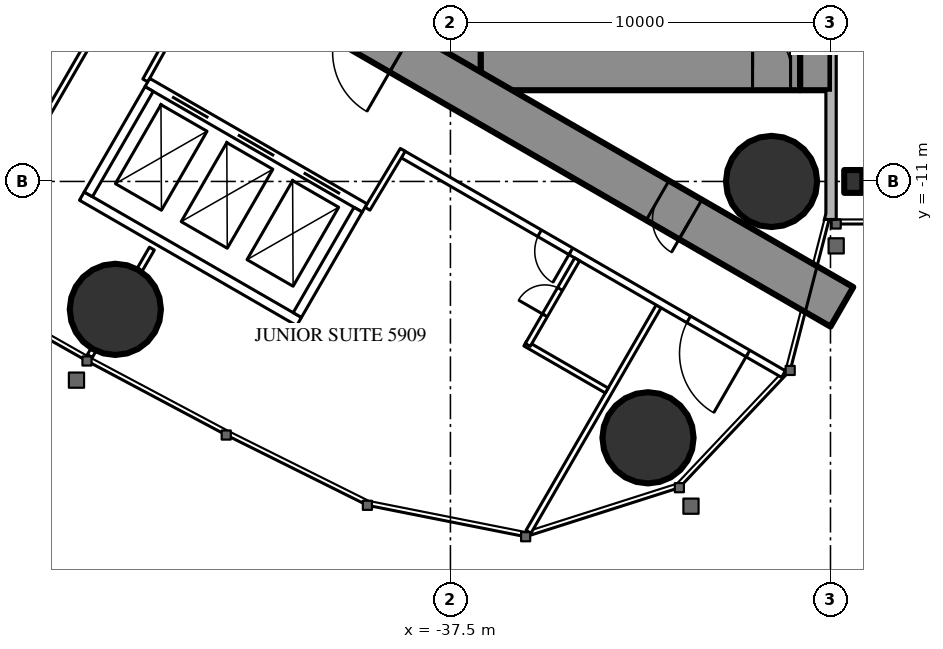
"""IFC4 building model, lengths in metres.
Left out: names, types, materials, properties, quantities, classifications, styles, units other than length and angle.
Written with IfcOpenShell. Run it as: python <this file> out.ifc"""

import sys

from ifc_helpers import new_model, si_unit, direction, frame, frame_2d, origin, origin_2d, place, context, subcontext, project, spatial, rectangle, circle, i_section, extrude, element, fill, save


model = new_model("IFC4")
c1 = context("Model", 3, precision=1e-05, world=origin(), true_north=direction((0.0, 1.0)))
c2 = subcontext(c1, "Body", "Model", "MODEL_VIEW")
j1 = project(units=[si_unit("LENGTHUNIT", "METRE"), si_unit("PLANEANGLEUNIT", "RADIAN")], contexts=[c1])
p1 = place(None, origin())
s1 = spatial("IfcSite", under=j1, at=p1, CompositionType="ELEMENT")
p2 = place(p1, origin())
s2 = spatial("IfcBuilding", under=s1, at=p2, CompositionType="ELEMENT")
p3 = place(p2, frame((0.0, 0.0, 222.5)))
s3 = spatial("IfcBuildingStorey", under=s2, at=p3, CompositionType="ELEMENT", Elevation=222.5)
for number, where, z_axis, x_axis in (
    (1, (-32.301, -17.745, 0.0), (0.0, 0.0, 1.0), (1.0, 0.0, 0.0)),
    (2, (-29.05, -11.0, 0.0), (0.0, 0.0, 1.0), (1.0, 0.0, 0.0)),
    (3, (-46.317, -14.365, 0.0), (0.0, 0.0, 1.0), (1.0, 0.0, 0.0)),
):
    element("IfcColumn", number, at=place(p3, frame(where, z_axis=z_axis, x_axis=x_axis)), inside=s3, PredefinedType="COLUMN", context=c2, shape_type="SweptSolid", body=[
        extrude(circle(Radius=1.2, at=origin_2d()), origin(), (0.0, 0.0, 1.0), 3.6),
    ])
p4 = place(p3, frame((-27.9, 8.6, 0.0), z_axis=(0.0, 0.0, 1.0), x_axis=(0.0, -1.0, 0.0)))
e4 = element("IfcWall", 4, at=p4, inside=s3, PredefinedType="SHEAR", context=c2, shape_type="SweptSolid", body=[
    extrude(rectangle(XDim=17.2, YDim=0.8, at=frame_2d((8.6, 0.0))), origin(), (0.0, 0.0, 1.0), 3.6),
])
p5 = place(p4, frame((6.95, 0.0, 0.0)))
e5 = element("IfcOpeningElement", 5, at=p5, cuts=e4, PredefinedType="OPENING", context=c2, shape_type="SweptSolid", body=[
    extrude(rectangle(XDim=0.9, YDim=2.2, at=frame_2d((0.45, 1.1))), frame((0.0, 0.41, 0.0), z_axis=(0.0, -1.0, 0.0), x_axis=(1.0, 0.0, 0.0)), (0.0, 0.0, 1.0), 0.82),
])
p6 = place(p3, frame((-37.3, 8.6, 0.0), z_axis=(0.0, 0.0, 1.0), x_axis=(0.0, -1.0, 0.0)))
e6 = element("IfcWall", 6, at=p6, inside=s3, PredefinedType="SHEAR", context=c2, shape_type="SweptSolid", body=[
    extrude(rectangle(XDim=17.2, YDim=1.2, at=frame_2d((8.6, 0.0))), origin(), (0.0, 0.0, 1.0), 3.6),
])
p7 = place(p6, frame((7.7, 0.0, 0.0)))
e7 = element("IfcOpeningElement", 7, at=p7, cuts=e6, PredefinedType="OPENING", context=c2, shape_type="SweptSolid", body=[
    extrude(rectangle(XDim=1.8, YDim=2.2, at=frame_2d((0.9, 1.1))), frame((0.0, 0.61, 0.0), z_axis=(0.0, -1.0, 0.0), x_axis=(1.0, 0.0, 0.0)), (0.0, 0.0, 1.0), 1.22),
])
p8 = place(p3, frame((-28.3, -8.0, 0.0), z_axis=(0.0, 0.0, 1.0), x_axis=(-1.0, 0.0, 0.0)))
e8 = element("IfcWall", 8, at=p8, inside=s3, PredefinedType="SHEAR", context=c2, shape_type="SweptSolid", body=[
    extrude(rectangle(XDim=8.4, YDim=1.2, at=frame_2d((4.2, 0.0))), origin(), (0.0, 0.0, 1.0), 3.6),
])
p9 = place(p8, frame((0.25, 0.0, 0.0)))
e9 = element("IfcOpeningElement", 9, at=p9, cuts=e8, PredefinedType="OPENING", context=c2, shape_type="SweptSolid", body=[
    extrude(rectangle(XDim=1.0, YDim=2.2, at=frame_2d((0.5, 1.1))), frame((0.0, 0.61, 0.0), z_axis=(0.0, -1.0, 0.0), x_axis=(1.0, 0.0, 0.0)), (0.0, 0.0, 1.0), 1.22),
])
p10 = place(p3, frame((-27.2, -14.3, 0.0), z_axis=(0.0, 0.0, 1.0), x_axis=(-0.866024021859, 0.500002393557, 0.0)))
e10 = element("IfcWall", 10, at=p10, inside=s3, PredefinedType="SHEAR", context=c2, shape_type="SweptSolid", body=[
    extrude(rectangle(XDim=27.907, YDim=1.2, at=frame_2d((13.954, 0.0))), origin(), (0.0, 0.0, 1.0), 3.6),
])
p11 = place(p10, frame((4.6, 0.0, 0.0)))
e11 = element("IfcOpeningElement", 11, at=p11, cuts=e10, PredefinedType="OPENING", context=c2, shape_type="SweptSolid", body=[
    extrude(rectangle(XDim=1.0, YDim=2.2, at=frame_2d((0.5, 1.1))), frame((0.0, 0.61, 0.0), z_axis=(0.0, -1.0, 0.0), x_axis=(1.0, 0.0, 0.0)), (0.0, 0.0, 1.0), 1.22),
])
p12 = place(p10, frame((13.395, 0.0, 0.0)))
e12 = element("IfcOpeningElement", 12, at=p12, cuts=e10, PredefinedType="OPENING", context=c2, shape_type="SweptSolid", body=[
    extrude(rectangle(XDim=1.8, YDim=2.2, at=frame_2d((0.9, 1.1))), frame((0.0, 0.61, 0.0), z_axis=(0.0, -1.0, 0.0), x_axis=(1.0, 0.0, 0.0)), (0.0, 0.0, 1.0), 1.22),
])
p13 = place(p3, frame((-26.9, -11.0, 0.0), z_axis=(0.0, 0.0, 1.0), x_axis=(1.0, 0.0, 0.0)))
e13 = element("IfcColumn", 13, at=p13, inside=s3, PredefinedType="COLUMN", context=c2, shape_type="SweptSolid", body=[
    extrude(i_section(OverallWidth=0.476, OverallDepth=0.6, WebThickness=0.1, FlangeThickness=0.14, FilletRadius=0.02, at=origin_2d()), origin(), (0.0, 0.0, 1.0), 3.6),
])
p14 = place(p3, frame((-32.022, -14.287, 0.0), z_axis=(0.0, 0.0, 1.0), x_axis=(-0.50000019414, -0.866025291697, 0.0)))
e14 = element("IfcWall", 14, at=p14, inside=s3, PredefinedType="PARTITIONING", context=c2, shape_type="SweptSolid", body=[
    extrude(rectangle(XDim=6.848, YDim=0.15, at=frame_2d((3.424, 0.0))), origin(), (0.0, 0.0, 1.0), 3.35),
])
p15 = place(p3, frame((-46.898, -15.439, 0.0), z_axis=(0.0, 0.0, 1.0), x_axis=(-0.500232303069, -0.865891241997, 0.0)))
e15 = element("IfcWall", 15, at=p15, inside=s3, PredefinedType="PARTITIONING", context=c2, shape_type="SweptSolid", body=[
    extrude(rectangle(XDim=0.18, YDim=0.15, at=frame_2d((0.09, 0.0))), origin(), (0.0, 0.0, 1.0), 2.45),
])
p16 = place(p3, frame((-46.274, -6.059, 0.0), z_axis=(0.0, 0.0, 1.0), x_axis=(-0.500020471368, -0.866013584312, 0.0)))
e16 = element("IfcWall", 16, at=p16, inside=s3, PredefinedType="PARTITIONING", context=c2, shape_type="SweptSolid", body=[
    extrude(rectangle(XDim=6.028, YDim=0.15, at=frame_2d((3.014, 0.0))), origin(), (0.0, 0.0, 1.0), 2.45),
])
p17 = place(p3, frame((-45.356, -12.767, 0.0), z_axis=(0.0, 0.0, 1.0), x_axis=(-0.499886366516, -0.866091000168, 0.0)))
e17 = element("IfcWall", 17, at=p17, inside=s3, PredefinedType="PARTITIONING", context=c2, shape_type="SweptSolid", body=[
    extrude(rectangle(XDim=0.645, YDim=0.15, at=frame_2d((0.322, 0.0))), origin(), (0.0, 0.0, 1.0), 3.35),
])
p18 = place(p3, frame((-28.737, -16.068, 0.0), z_axis=(0.0, 0.0, 1.0), x_axis=(-0.866029399323, 0.49999307946, 0.0)))
e18 = element("IfcWall", 18, at=p18, inside=s3, PredefinedType="PARTITIONING", context=c2, shape_type="SweptSolid", body=[
    extrude(rectangle(XDim=11.61, YDim=0.2, at=frame_2d((5.805, 0.0))), origin(), (0.0, 0.0, 1.0), 3.35),
])
p19 = place(p18, frame((1.08, 0.0, 0.0)))
e19 = element("IfcOpeningElement", 19, at=p19, cuts=e18, PredefinedType="OPENING", context=c2, shape_type="SweptSolid", body=[
    extrude(rectangle(XDim=1.8, YDim=2.03, at=frame_2d((0.9, 1.015))), frame((0.0, 0.11, 0.0), z_axis=(0.0, -1.0, 0.0), x_axis=(1.0, 0.0, 0.0)), (0.0, 0.0, 1.0), 0.22),
])
p20 = place(p18, frame((6.46, 0.0, 0.0)))
e20 = element("IfcOpeningElement", 20, at=p20, cuts=e18, PredefinedType="OPENING", context=c2, shape_type="SweptSolid", body=[
    extrude(rectangle(XDim=0.95, YDim=2.2, at=frame_2d((0.475, 1.1))), frame((0.0, 0.11, 0.0), z_axis=(0.0, -1.0, 0.0), x_axis=(1.0, 0.0, 0.0)), (0.0, 0.0, 1.0), 0.22),
])
for number, where, z_axis, x_axis in (
    (21, (-39.683, -11.718, 0.0), (0.0, 0.0, 1.0), (0.514, 0.858, 0.0)),
    (22, (-44.652, -6.764, 0.0), (0.0, 0.0, 1.0), (-0.485, -0.874, 0.0)),
):
    element("IfcWall", number, at=place(p3, frame(where, z_axis=z_axis, x_axis=x_axis)), inside=s3, PredefinedType="PARTITIONING", context=c2, shape_type="SweptSolid", body=[
        extrude(rectangle(XDim=1.805, YDim=0.15, at=frame_2d((0.903, 0.0))), origin(), (0.0, 0.0, 1.0), 3.35),
    ])
p21 = place(p3, frame((-33.387, -16.502, 0.0), z_axis=(0.0, 0.0, 1.0), x_axis=(-0.866006523861, 0.500032699561, 0.0)))
e23 = element("IfcWall", 23, at=p21, inside=s3, PredefinedType="PARTITIONING", context=c2, shape_type="SweptSolid", body=[
    extrude(rectangle(XDim=2.475, YDim=0.15, at=frame_2d((1.237, 0.0))), origin(), (0.0, 0.0, 1.0), 3.35),
])
p22 = place(p3, frame((-34.165, -13.05, 0.0), z_axis=(0.0, 0.0, 1.0), x_axis=(-0.500047596559, -0.865997922154, 0.0)))
e24 = element("IfcWall", 24, at=p22, inside=s3, PredefinedType="PARTITIONING", context=c2, shape_type="SweptSolid", body=[
    extrude(rectangle(XDim=2.6, YDim=0.15, at=frame_2d((1.3, 0.0))), origin(), (0.0, 0.0, 1.0), 3.35),
])
p23 = place(p22, frame((0.9, 0.0, 0.0)))
e25 = element("IfcOpeningElement", 25, at=p23, cuts=e24, PredefinedType="OPENING", context=c2, shape_type="SweptSolid", body=[
    extrude(rectangle(XDim=0.8, YDim=2.2, at=frame_2d((0.4, 1.1))), frame((0.0, 0.085, 0.0), z_axis=(0.0, -1.0, 0.0), x_axis=(1.0, 0.0, 0.0)), (0.0, 0.0, 1.0), 0.17),
])
p24 = place(p3, frame((-39.758, -11.697, 0.0), z_axis=(0.0, 0.0, 1.0), x_axis=(-0.866024194504, 0.500002094529, 0.0)))
e26 = element("IfcWall", 26, at=p24, inside=s3, PredefinedType="PARTITIONING", context=c2, shape_type="SweptSolid", body=[
    extrude(rectangle(XDim=6.6, YDim=0.25, at=frame_2d((3.3, 0.0))), origin(), (0.0, 0.0, 1.0), 3.35),
])
p25 = place(p24, frame((0.75, 0.0, 0.0)))
e27 = element("IfcOpeningElement", 27, at=p25, cuts=e26, PredefinedType="OPENING", context=c2, shape_type="SweptSolid", body=[
    extrude(rectangle(XDim=1.1, YDim=2.2, at=frame_2d((0.55, 1.1))), frame((0.0, 0.135, 0.0), z_axis=(0.0, -1.0, 0.0), x_axis=(1.0, 0.0, 0.0)), (0.0, 0.0, 1.0), 0.27),
])
p26 = place(p24, frame((2.75, 0.0, 0.0)))
e28 = element("IfcOpeningElement", 28, at=p26, cuts=e26, PredefinedType="OPENING", context=c2, shape_type="SweptSolid", body=[
    extrude(rectangle(XDim=1.1, YDim=2.2, at=frame_2d((0.55, 1.1))), frame((0.0, 0.135, 0.0), z_axis=(0.0, -1.0, 0.0), x_axis=(1.0, 0.0, 0.0)), (0.0, 0.0, 1.0), 0.27),
])
p27 = place(p24, frame((4.75, 0.0, 0.0)))
e29 = element("IfcOpeningElement", 29, at=p27, cuts=e26, PredefinedType="OPENING", context=c2, shape_type="SweptSolid", body=[
    extrude(rectangle(XDim=1.1, YDim=2.2, at=frame_2d((0.55, 1.1))), frame((0.0, 0.135, 0.0), z_axis=(0.0, -1.0, 0.0), x_axis=(1.0, 0.0, 0.0)), (0.0, 0.0, 1.0), 0.27),
])
p28 = place(p3, frame((-41.482, -14.686, 0.0), z_axis=(0.0, 0.0, 1.0), x_axis=(-0.86603344179, 0.499986077507, 0.0)))
e30 = element("IfcWall", 30, at=p28, inside=s3, PredefinedType="PARTITIONING", context=c2, shape_type="SweptSolid", body=[
    extrude(rectangle(XDim=6.6, YDim=0.25, at=frame_2d((3.3, 0.0))), origin(), (0.0, 0.0, 1.0), 3.35),
])
for number, where, z_axis, x_axis in (
    (31, (-39.928, -11.743, 0.0), (0.0, 0.0, 1.0), (-0.5, -0.866, 0.0)),
    (32, (-45.428, -8.568, 0.0), (0.0, 0.0, 1.0), (-0.5, -0.866, 0.0)),
):
    element("IfcWall", number, at=place(p3, frame(where, z_axis=z_axis, x_axis=x_axis)), inside=s3, PredefinedType="PARTITIONING", context=c2, shape_type="SweptSolid", body=[
        extrude(rectangle(XDim=3.201, YDim=0.25, at=frame_2d((1.6, 0.0))), origin(), (0.0, 0.0, 1.0), 3.35),
    ])
p29 = place(p19, origin())
e33 = element("IfcDoor", 33, at=p29, inside=s3, OperationType="DOUBLE_DOOR_SINGLE_SWING", PredefinedType="DOOR", context=c2, shape_type="SweptSolid", body=[
    extrude(rectangle(XDim=1.8, YDim=2.03, at=frame_2d((0.9, 1.015))), frame((0.0, 0.025, 0.0), z_axis=(0.0, -1.0, 0.0), x_axis=(1.0, 0.0, 0.0)), (0.0, 0.0, 1.0), 0.05),
])
fill(e19, e33)
p30 = place(p23, origin())
e34 = element("IfcDoor", 34, at=p30, inside=s3, OperationType="SINGLE_SWING_RIGHT", PredefinedType="DOOR", context=c2, shape_type="SweptSolid", body=[
    extrude(rectangle(XDim=0.8, YDim=2.2, at=frame_2d((0.4, 1.1))), frame((0.0, 0.025, 0.0), z_axis=(0.0, -1.0, 0.0), x_axis=(1.0, 0.0, 0.0)), (0.0, 0.0, 1.0), 0.05),
])
fill(e25, e34)
p31 = place(p20, origin())
e35 = element("IfcDoor", 35, at=p31, inside=s3, OperationType="SINGLE_SWING_LEFT", PredefinedType="DOOR", context=c2, shape_type="SweptSolid", body=[
    extrude(rectangle(XDim=0.95, YDim=2.2, at=frame_2d((0.475, 1.1))), frame((0.0, 0.025, 0.0), z_axis=(0.0, -1.0, 0.0), x_axis=(1.0, 0.0, 0.0)), (0.0, 0.0, 1.0), 0.05),
])
fill(e20, e35)
p32 = place(p11, origin())
e36 = element("IfcDoor", 36, at=p32, inside=s3, OperationType="SINGLE_SWING_LEFT", PredefinedType="DOOR", context=c2, shape_type="SweptSolid", body=[
    extrude(rectangle(XDim=1.0, YDim=2.2, at=frame_2d((0.5, 1.1))), frame((0.0, 0.025, 0.0), z_axis=(0.0, -1.0, 0.0), x_axis=(1.0, 0.0, 0.0)), (0.0, 0.0, 1.0), 0.05),
])
fill(e11, e36)
p33 = place(p12, origin())
e37 = element("IfcDoor", 37, at=p33, inside=s3, OperationType="DOUBLE_DOOR_SINGLE_SWING", PredefinedType="DOOR", context=c2, shape_type="SweptSolid", body=[
    extrude(rectangle(XDim=1.8, YDim=2.2, at=frame_2d((0.9, 1.1))), frame((0.0, 0.025, 0.0), z_axis=(0.0, -1.0, 0.0), x_axis=(1.0, 0.0, 0.0)), (0.0, 0.0, 1.0), 0.05),
])
fill(e12, e37)
p34 = place(p9, origin())
e38 = element("IfcDoor", 38, at=p34, inside=s3, OperationType="SINGLE_SWING_RIGHT", PredefinedType="DOOR", context=c2, shape_type="SweptSolid", body=[
    extrude(rectangle(XDim=1.0, YDim=2.2, at=frame_2d((0.5, 1.1))), frame((0.0, 0.025, 0.0), z_axis=(0.0, -1.0, 0.0), x_axis=(1.0, 0.0, 0.0)), (0.0, 0.0, 1.0), 0.05),
])
fill(e9, e38)
p35 = place(p25, origin())
e39 = element("IfcDoor", 39, at=p35, inside=s3, OperationType="DOUBLE_DOOR_SLIDING", PredefinedType="USERDEFINED", context=c2, shape_type="SweptSolid", body=[
    extrude(rectangle(XDim=1.1, YDim=2.2, at=frame_2d((0.55, 1.1))), frame((0.0, 0.025, 0.0), z_axis=(0.0, -1.0, 0.0), x_axis=(1.0, 0.0, 0.0)), (0.0, 0.0, 1.0), 0.05),
])
fill(e27, e39)
p36 = place(p26, origin())
e40 = element("IfcDoor", 40, at=p36, inside=s3, OperationType="DOUBLE_DOOR_SLIDING", PredefinedType="USERDEFINED", context=c2, shape_type="SweptSolid", body=[
    extrude(rectangle(XDim=1.1, YDim=2.2, at=frame_2d((0.55, 1.1))), frame((0.0, 0.025, 0.0), z_axis=(0.0, -1.0, 0.0), x_axis=(1.0, 0.0, 0.0)), (0.0, 0.0, 1.0), 0.05),
])
fill(e28, e40)
p37 = place(p27, origin())
e41 = element("IfcDoor", 41, at=p37, inside=s3, OperationType="DOUBLE_DOOR_SLIDING", PredefinedType="USERDEFINED", context=c2, shape_type="SweptSolid", body=[
    extrude(rectangle(XDim=1.1, YDim=2.2, at=frame_2d((0.55, 1.1))), frame((0.0, 0.025, 0.0), z_axis=(0.0, -1.0, 0.0), x_axis=(1.0, 0.0, 0.0)), (0.0, 0.0, 1.0), 0.05),
])
fill(e29, e41)
save(model, sys.argv[1])
